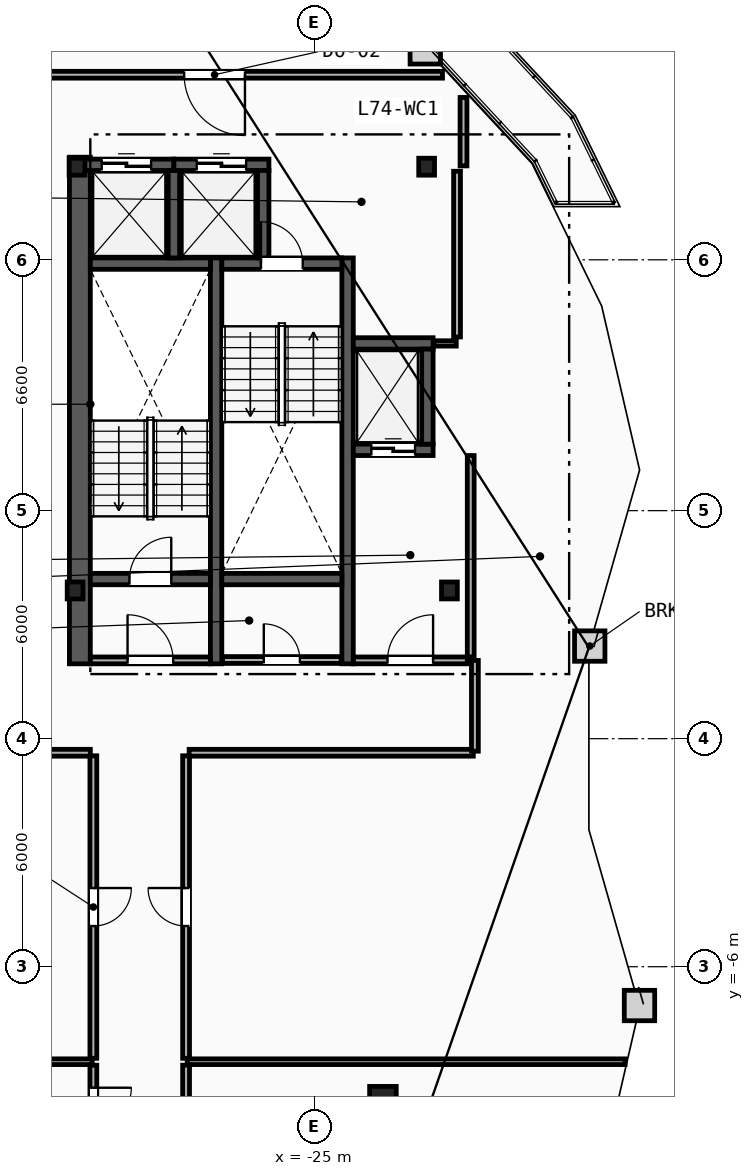
"""IFC4 building model, lengths in metres.
Left out: names, types, materials, properties, quantities, classifications, styles, units other than length and angle.
Written with IfcOpenShell. Run it as: python <this file> out.ifc"""

import sys

from ifc_helpers import new_model, si_unit, direction, frame, frame_2d, origin, origin_2d, place, context, subcontext, project, spatial, rectangle, i_section, extrude, element, fill, save


model = new_model("IFC4")
c1 = context("Model", 3, precision=1e-05, world=origin(), true_north=direction((0.0, 1.0)))
c2 = subcontext(c1, "Body", "Model", "MODEL_VIEW")
j1 = project(units=[si_unit("LENGTHUNIT", "METRE"), si_unit("PLANEANGLEUNIT", "RADIAN")], contexts=[c1])
p1 = place(None, origin())
s1 = spatial("IfcSite", under=j1, at=p1, CompositionType="ELEMENT")
p2 = place(p1, origin())
s2 = spatial("IfcBuilding", under=s1, at=p2, CompositionType="ELEMENT")
p3 = place(p2, frame((0.0, 0.0, 279.2)))
s3 = spatial("IfcBuildingStorey", under=s2, at=p3, CompositionType="ELEMENT", Elevation=279.2)
for number, where, z_axis, x_axis in (
    (1, (-31.3, 3.9, 0.0), (0.0, 0.0, 1.0), (1.0, 0.0, 0.0)),
    (2, (-21.45, 3.9, 0.0), (0.0, 0.0, 1.0), (1.0, 0.0, 0.0)),
    (3, (-22.05, 15.05, 0.0), (0.0, 0.0, 1.0), (1.0, 0.0, 0.0)),
    (4, (-31.25, 15.05, 0.0), (0.0, 0.0, 1.0), (1.0, 0.0, 0.0)),
):
    element("IfcColumn", number, at=place(p3, frame(where, z_axis=z_axis, x_axis=x_axis)), inside=s3, PredefinedType="COLUMN", context=c2, shape_type="SweptSolid", body=[
        extrude(i_section(OverallWidth=0.416, OverallDepth=0.446, WebThickness=0.039, FlangeThickness=0.063, FilletRadius=0.018, at=origin_2d()), origin(), (0.0, 0.0, 1.0), 3.6),
    ])
p4 = place(p3, frame((-23.2, -9.5, 0.0), z_axis=(0.0, 0.0, 1.0), x_axis=(1.0, 0.0, 0.0)))
e5 = element("IfcColumn", 5, at=p4, inside=s3, PredefinedType="COLUMN", context=c2, shape_type="SweptSolid", body=[
    extrude(rectangle(XDim=0.7, YDim=0.7, at=origin_2d()), origin(), (0.0, 0.0, 1.0), 3.6),
])
p5 = place(p3, frame((-31.175, 1.97, 0.0), z_axis=(0.0, 0.0, 1.0), x_axis=(0.0, 1.0, 0.0)))
e6 = element("IfcWall", 6, at=p5, inside=s3, PredefinedType="SHEAR", context=c2, shape_type="SweptSolid", body=[
    extrude(rectangle(XDim=13.33, YDim=0.55, at=frame_2d((6.665, 0.0))), origin(), (0.0, 0.0, 1.0), 3.34),
])
for number, where, z_axis, x_axis in (
    (7, (-27.59, 1.97, 0.0), (0.0, 0.0, 1.0), (0.0, 1.0, 0.0)),
    (8, (-24.13, 1.97, 0.0), (0.0, 0.0, 1.0), (0.0, 1.0, 0.0)),
):
    element("IfcWall", number, at=place(p3, frame(where, z_axis=z_axis, x_axis=x_axis)), inside=s3, PredefinedType="SHEAR", context=c2, shape_type="SweptSolid", body=[
        extrude(rectangle(XDim=10.68, YDim=0.3, at=frame_2d((5.34, 0.0))), origin(), (0.0, 0.0, 1.0), 3.34),
    ])
p6 = place(p3, frame((-30.9, 4.2, 0.0), z_axis=(0.0, 0.0, 1.0), x_axis=(1.0, 0.0, 0.0)))
e9 = element("IfcWall", 9, at=p6, inside=s3, PredefinedType="SHEAR", context=c2, shape_type="SweptSolid", body=[
    extrude(rectangle(XDim=3.16, YDim=0.3, at=frame_2d((1.58, 0.0))), origin(), (0.0, 0.0, 1.0), 3.34),
])
p7 = place(p6, frame((1.03, 0.0, 0.0)))
e10 = element("IfcOpeningElement", 10, at=p7, cuts=e9, PredefinedType="OPENING", context=c2, shape_type="SweptSolid", body=[
    extrude(rectangle(XDim=1.1, YDim=2.15, at=frame_2d((0.55, 1.075))), frame((0.0, 0.16, 0.0), z_axis=(0.0, -1.0, 0.0), x_axis=(1.0, 0.0, 0.0)), (0.0, 0.0, 1.0), 0.32),
])
p8 = place(p3, frame((-30.9, 12.5, 0.0), z_axis=(0.0, 0.0, 1.0), x_axis=(1.0, 0.0, 0.0)))
e11 = element("IfcWall", 11, at=p8, inside=s3, PredefinedType="SHEAR", context=c2, shape_type="SweptSolid", body=[
    extrude(rectangle(XDim=3.16, YDim=0.3, at=frame_2d((1.58, 0.0))), origin(), (0.0, 0.0, 1.0), 3.34),
])
p9 = place(p3, frame((-27.44, 12.5, 0.0), z_axis=(0.0, 0.0, 1.0), x_axis=(1.0, 0.0, 0.0)))
e12 = element("IfcWall", 12, at=p9, inside=s3, PredefinedType="SHEAR", context=c2, shape_type="SweptSolid", body=[
    extrude(rectangle(XDim=3.16, YDim=0.3, at=frame_2d((1.58, 0.0))), origin(), (0.0, 0.0, 1.0), 3.34),
])
p10 = place(p9, frame((1.03, 0.0, 0.0)))
e13 = element("IfcOpeningElement", 13, at=p10, cuts=e12, PredefinedType="OPENING", context=c2, shape_type="SweptSolid", body=[
    extrude(rectangle(XDim=1.1, YDim=2.15, at=frame_2d((0.55, 1.075))), frame((0.0, 0.16, 0.0), z_axis=(0.0, -1.0, 0.0), x_axis=(1.0, 0.0, 0.0)), (0.0, 0.0, 1.0), 0.32),
])
p11 = place(p3, frame((-27.44, 4.2, 0.0), z_axis=(0.0, 0.0, 1.0), x_axis=(1.0, 0.0, 0.0)))
e14 = element("IfcWall", 14, at=p11, inside=s3, PredefinedType="SHEAR", context=c2, shape_type="SweptSolid", body=[
    extrude(rectangle(XDim=3.16, YDim=0.3, at=frame_2d((1.58, 0.0))), origin(), (0.0, 0.0, 1.0), 3.34),
])
p12 = place(p3, frame((-20.89, 2.15, 0.0), z_axis=(0.0, 0.0, 1.0), x_axis=(0.0, 1.0, 0.0)))
e15 = element("IfcWall", 15, at=p12, inside=s3, PredefinedType="PARTITIONING", context=c2, shape_type="SweptSolid", body=[
    extrude(rectangle(XDim=5.3, YDim=0.18, at=frame_2d((2.65, 0.0))), origin(), (0.0, 0.0, 1.0), 3.34),
])
p13 = place(p3, frame((-23.98, 2.06, 0.0), z_axis=(0.0, 0.0, 1.0), x_axis=(1.0, 0.0, 0.0)))
e16 = element("IfcWall", 16, at=p13, inside=s3, PredefinedType="PARTITIONING", context=c2, shape_type="SweptSolid", body=[
    extrude(rectangle(XDim=3.0, YDim=0.18, at=frame_2d((1.5, 0.0))), origin(), (0.0, 0.0, 1.0), 3.34),
])
p14 = place(p13, frame((0.9, 0.0, 0.0)))
e17 = element("IfcOpeningElement", 17, at=p14, cuts=e16, PredefinedType="OPENING", context=c2, shape_type="SweptSolid", body=[
    extrude(rectangle(XDim=1.2, YDim=2.15, at=frame_2d((0.6, 1.075))), frame((0.0, 0.1, 0.0), z_axis=(0.0, -1.0, 0.0), x_axis=(1.0, 0.0, 0.0)), (0.0, 0.0, 1.0), 0.2),
])
p15 = place(p3, frame((-30.9, 2.06, 0.0), z_axis=(0.0, 0.0, 1.0), x_axis=(1.0, 0.0, 0.0)))
e18 = element("IfcWall", 18, at=p15, inside=s3, PredefinedType="PARTITIONING", context=c2, shape_type="SweptSolid", body=[
    extrude(rectangle(XDim=3.16, YDim=0.18, at=frame_2d((1.58, 0.0))), origin(), (0.0, 0.0, 1.0), 3.34),
])
p16 = place(p15, frame((0.98, 0.0, 0.0)))
e19 = element("IfcOpeningElement", 19, at=p16, cuts=e18, PredefinedType="OPENING", context=c2, shape_type="SweptSolid", body=[
    extrude(rectangle(XDim=1.2, YDim=2.15, at=frame_2d((0.6, 1.075))), frame((0.0, 0.1, 0.0), z_axis=(0.0, -1.0, 0.0), x_axis=(1.0, 0.0, 0.0)), (0.0, 0.0, 1.0), 0.2),
])
p17 = place(p3, frame((-23.98, 7.6, 0.0), z_axis=(0.0, 0.0, 1.0), x_axis=(1.0, 0.0, 0.0)))
e20 = element("IfcWall", 20, at=p17, inside=s3, PredefinedType="SHEAR", context=c2, shape_type="SweptSolid", body=[
    extrude(rectangle(XDim=2.1, YDim=0.3, at=frame_2d((1.05, 0.0))), origin(), (0.0, 0.0, 1.0), 3.34),
])
p18 = place(p17, frame((0.475, 0.0, 0.0)))
e21 = element("IfcOpeningElement", 21, at=p18, cuts=e20, PredefinedType="OPENING", context=c2, shape_type="SweptSolid", body=[
    extrude(rectangle(XDim=1.15, YDim=2.2, at=frame_2d((0.575, 1.1))), frame((0.0, 0.16, 0.0), z_axis=(0.0, -1.0, 0.0), x_axis=(1.0, 0.0, 0.0)), (0.0, 0.0, 1.0), 0.32),
])
p19 = place(p3, frame((-23.98, 10.4, 0.0), z_axis=(0.0, 0.0, 1.0), x_axis=(1.0, 0.0, 0.0)))
e22 = element("IfcWall", 22, at=p19, inside=s3, PredefinedType="SHEAR", context=c2, shape_type="SweptSolid", body=[
    extrude(rectangle(XDim=2.1, YDim=0.3, at=frame_2d((1.05, 0.0))), origin(), (0.0, 0.0, 1.0), 3.34),
])
p20 = place(p3, frame((-22.03, 7.75, 0.0), z_axis=(0.0, 0.0, 1.0), x_axis=(0.0, 1.0, 0.0)))
e23 = element("IfcWall", 23, at=p20, inside=s3, PredefinedType="SHEAR", context=c2, shape_type="SweptSolid", body=[
    extrude(rectangle(XDim=2.5, YDim=0.3, at=frame_2d((1.25, 0.0))), origin(), (0.0, 0.0, 1.0), 3.34),
])
p21 = place(p3, frame((-31.2, 15.1, 0.0), z_axis=(0.0, 0.0, 1.0), x_axis=(1.0, 0.0, 0.0)))
e24 = element("IfcWall", 24, at=p21, inside=s3, PredefinedType="SHEAR", context=c2, shape_type="SweptSolid", body=[
    extrude(rectangle(XDim=2.5, YDim=0.3, at=frame_2d((1.25, 0.0))), origin(), (0.0, 0.0, 1.0), 3.34),
])
p22 = place(p21, frame((0.6, 0.0, 0.0)))
e25 = element("IfcOpeningElement", 25, at=p22, cuts=e24, PredefinedType="OPENING", context=c2, shape_type="SweptSolid", body=[
    extrude(rectangle(XDim=1.3, YDim=2.2, at=frame_2d((0.65, 1.1))), frame((0.0, 0.16, 0.0), z_axis=(0.0, -1.0, 0.0), x_axis=(1.0, 0.0, 0.0)), (0.0, 0.0, 1.0), 0.32),
])
p23 = place(p3, frame((-28.7, 12.65, 0.0), z_axis=(0.0, 0.0, 1.0), x_axis=(0.0, 1.0, 0.0)))
e26 = element("IfcWall", 26, at=p23, inside=s3, PredefinedType="SHEAR", context=c2, shape_type="SweptSolid", body=[
    extrude(rectangle(XDim=2.3, YDim=0.3, at=frame_2d((1.15, 0.0))), origin(), (0.0, 0.0, 1.0), 3.34),
])
p24 = place(p3, frame((-28.7, 15.1, 0.0), z_axis=(0.0, 0.0, 1.0), x_axis=(1.0, 0.0, 0.0)))
e27 = element("IfcWall", 27, at=p24, inside=s3, PredefinedType="SHEAR", context=c2, shape_type="SweptSolid", body=[
    extrude(rectangle(XDim=2.5, YDim=0.3, at=frame_2d((1.25, 0.0))), origin(), (0.0, 0.0, 1.0), 3.34),
])
p25 = place(p24, frame((0.6, 0.0, 0.0)))
e28 = element("IfcOpeningElement", 28, at=p25, cuts=e27, PredefinedType="OPENING", context=c2, shape_type="SweptSolid", body=[
    extrude(rectangle(XDim=1.3, YDim=2.2, at=frame_2d((0.65, 1.1))), frame((0.0, 0.16, 0.0), z_axis=(0.0, -1.0, 0.0), x_axis=(1.0, 0.0, 0.0)), (0.0, 0.0, 1.0), 0.32),
])
p26 = place(p3, frame((-26.35, 12.65, 0.0), z_axis=(0.0, 0.0, 1.0), x_axis=(0.0, 1.0, 0.0)))
e29 = element("IfcWall", 29, at=p26, inside=s3, PredefinedType="SHEAR", context=c2, shape_type="SweptSolid", body=[
    extrude(rectangle(XDim=2.3, YDim=0.3, at=frame_2d((1.15, 0.0))), origin(), (0.0, 0.0, 1.0), 3.34),
])
p27 = place(p3, frame((-21.86, 10.4, 0.0), z_axis=(0.0, 0.0, 1.0), x_axis=(1.0, 0.0, 0.0)))
e30 = element("IfcWall", 30, at=p27, inside=s3, PredefinedType="PARTITIONING", context=c2, shape_type="SweptSolid", body=[
    extrude(rectangle(XDim=0.59, YDim=0.14, at=frame_2d((0.295, 0.0))), origin(), (0.0, 0.0, 1.0), 3.34),
])
p28 = place(p3, frame((-21.25, 10.57, 0.0), z_axis=(0.0, 0.0, 1.0), x_axis=(0.0, 1.0, 0.0)))
e31 = element("IfcWall", 31, at=p28, inside=s3, PredefinedType="PARTITIONING", context=c2, shape_type="SweptSolid", body=[
    extrude(rectangle(XDim=4.36, YDim=0.18, at=frame_2d((2.18, 0.0))), origin(), (0.0, 0.0, 1.0), 3.34),
])
p29 = place(p3, frame((-27.42, 2.07, 0.0), z_axis=(0.0, 0.0, 1.0), x_axis=(1.0, 0.0, 0.0)))
e32 = element("IfcWall", 32, at=p29, inside=s3, PredefinedType="PARTITIONING", context=c2, shape_type="SweptSolid", body=[
    extrude(rectangle(XDim=3.12, YDim=0.18, at=frame_2d((1.56, 0.0))), origin(), (0.0, 0.0, 1.0), 3.34),
])
p30 = place(p29, frame((1.085, 0.0, 0.0)))
e33 = element("IfcOpeningElement", 33, at=p30, cuts=e32, PredefinedType="OPENING", context=c2, shape_type="SweptSolid", body=[
    extrude(rectangle(XDim=0.95, YDim=2.1, at=frame_2d((0.475, 1.05))), frame((0.0, 0.1, 0.0), z_axis=(0.0, -1.0, 0.0), x_axis=(1.0, 0.0, 0.0)), (0.0, 0.0, 1.0), 0.2),
])
p31 = place(p3, frame((-47.172, -8.5, 0.0), z_axis=(0.0, 0.0, 1.0), x_axis=(1.0, 0.0, 0.0)))
e34 = element("IfcWall", 34, at=p31, inside=s3, PredefinedType="PARTITIONING", context=c2, shape_type="SweptSolid", body=[
    extrude(rectangle(XDim=16.322, YDim=0.15, at=frame_2d((8.161, 0.0))), origin(), (0.0, 0.0, 1.0), 3.34),
])
p32 = place(p3, frame((-28.35, -8.5, 0.0), z_axis=(0.0, 0.0, 1.0), x_axis=(1.0, 0.0, 0.0)))
e35 = element("IfcWall", 35, at=p32, inside=s3, PredefinedType="PARTITIONING", context=c2, shape_type="SweptSolid", body=[
    extrude(rectangle(XDim=11.522, YDim=0.15, at=frame_2d((5.761, 0.0))), origin(), (0.0, 0.0, 1.0), 3.34),
])
p33 = place(p3, frame((-30.82, -8.59, 0.0), z_axis=(0.0, 0.0, 1.0), x_axis=(0.0, -1.0, 0.0)))
e36 = element("IfcWall", 36, at=p33, inside=s3, PredefinedType="PARTITIONING", context=c2, shape_type="SweptSolid", body=[
    extrude(rectangle(XDim=2.188, YDim=0.18, at=frame_2d((1.094, 0.0))), origin(), (0.0, 0.0, 1.0), 3.34),
])
p34 = place(p33, frame((0.594, 0.0, 0.0)))
e37 = element("IfcOpeningElement", 37, at=p34, cuts=e36, PredefinedType="OPENING", context=c2, shape_type="SweptSolid", body=[
    extrude(rectangle(XDim=1.0, YDim=2.15, at=frame_2d((0.5, 1.075))), frame((0.0, 0.1, 0.0), z_axis=(0.0, -1.0, 0.0), x_axis=(1.0, 0.0, 0.0)), (0.0, 0.0, 1.0), 0.2),
])
p35 = place(p3, frame((-28.38, -10.779, 0.0), z_axis=(0.0, 0.0, 1.0), x_axis=(0.0, 1.0, 0.0)))
e38 = element("IfcWall", 38, at=p35, inside=s3, PredefinedType="PARTITIONING", context=c2, shape_type="SweptSolid", body=[
    extrude(rectangle(XDim=2.188, YDim=0.18, at=frame_2d((1.094, 0.0))), origin(), (0.0, 0.0, 1.0), 3.34),
])
p36 = place(p3, frame((-30.82, -0.45, 0.0), z_axis=(0.0, 0.0, 1.0), x_axis=(0.0, -1.0, 0.0)))
e39 = element("IfcWall", 39, at=p36, inside=s3, PredefinedType="PARTITIONING", context=c2, shape_type="SweptSolid", body=[
    extrude(rectangle(XDim=7.96, YDim=0.18, at=frame_2d((3.98, 0.0))), origin(), (0.0, 0.0, 1.0), 3.34),
])
p37 = place(p36, frame((3.48, 0.0, 0.0)))
e40 = element("IfcOpeningElement", 40, at=p37, cuts=e39, PredefinedType="OPENING", context=c2, shape_type="SweptSolid", body=[
    extrude(rectangle(XDim=1.0, YDim=2.15, at=frame_2d((0.5, 1.075))), frame((0.0, 0.1, 0.0), z_axis=(0.0, -1.0, 0.0), x_axis=(1.0, 0.0, 0.0)), (0.0, 0.0, 1.0), 0.2),
])
p38 = place(p3, frame((-33.628, -0.37, 0.0), z_axis=(0.0, 0.0, 1.0), x_axis=(1.0, 0.0, 0.0)))
e41 = element("IfcWall", 41, at=p38, inside=s3, PredefinedType="PARTITIONING", context=c2, shape_type="SweptSolid", body=[
    extrude(rectangle(XDim=2.729, YDim=0.18, at=frame_2d((1.364, 0.0))), origin(), (0.0, 0.0, 1.0), 3.34),
])
p39 = place(p3, frame((-28.38, -8.41, 0.0), z_axis=(0.0, 0.0, 1.0), x_axis=(0.0, 1.0, 0.0)))
e42 = element("IfcWall", 42, at=p39, inside=s3, PredefinedType="PARTITIONING", context=c2, shape_type="SweptSolid", body=[
    extrude(rectangle(XDim=7.96, YDim=0.18, at=frame_2d((3.98, 0.0))), origin(), (0.0, 0.0, 1.0), 3.34),
])
p40 = place(p39, frame((3.48, 0.0, 0.0)))
e43 = element("IfcOpeningElement", 43, at=p40, cuts=e42, PredefinedType="OPENING", context=c2, shape_type="SweptSolid", body=[
    extrude(rectangle(XDim=1.0, YDim=2.15, at=frame_2d((0.5, 1.075))), frame((0.0, 0.1, 0.0), z_axis=(0.0, -1.0, 0.0), x_axis=(1.0, 0.0, 0.0)), (0.0, 0.0, 1.0), 0.2),
])
p41 = place(p3, frame((-28.3, -0.37, 0.0), z_axis=(0.0, 0.0, 1.0), x_axis=(1.0, 0.0, 0.0)))
e44 = element("IfcWall", 44, at=p41, inside=s3, PredefinedType="PARTITIONING", context=c2, shape_type="SweptSolid", body=[
    extrude(rectangle(XDim=7.479, YDim=0.18, at=frame_2d((3.739, 0.0))), origin(), (0.0, 0.0, 1.0), 3.34),
])
p42 = place(p3, frame((-20.78, -0.329, 0.0), z_axis=(0.0, 0.0, 1.0), x_axis=(0.0, 1.0, 0.0)))
e45 = element("IfcWall", 45, at=p42, inside=s3, PredefinedType="PARTITIONING", context=c2, shape_type="SweptSolid", body=[
    extrude(rectangle(XDim=2.387, YDim=0.18, at=frame_2d((1.194, 0.0))), origin(), (0.0, 0.0, 1.0), 3.34),
])
p43 = place(p3, frame((-21.08, 15.072, 0.0), z_axis=(0.0, 0.0, 1.0), x_axis=(0.0, 1.0, 0.0)))
e46 = element("IfcWall", 46, at=p43, inside=s3, PredefinedType="PARTITIONING", context=c2, shape_type="SweptSolid", body=[
    extrude(rectangle(XDim=1.801, YDim=0.18, at=frame_2d((0.9, 0.0))), origin(), (0.0, 0.0, 1.0), 3.34),
])
p44 = place(p3, frame((-21.632, 17.47, 0.0), z_axis=(0.0, 0.0, 1.0), x_axis=(-1.0, 0.0, 0.0)))
e47 = element("IfcWall", 47, at=p44, inside=s3, PredefinedType="PARTITIONING", context=c2, shape_type="SweptSolid", body=[
    extrude(rectangle(XDim=11.996, YDim=0.18, at=frame_2d((5.998, 0.0))), origin(), (0.0, 0.0, 1.0), 3.34),
])
p45 = place(p44, frame((5.198, 0.0, 0.0)))
e48 = element("IfcOpeningElement", 48, at=p45, cuts=e47, PredefinedType="OPENING", context=c2, shape_type="SweptSolid", body=[
    extrude(rectangle(XDim=1.6, YDim=2.2, at=frame_2d((0.8, 1.1))), frame((0.0, 0.1, 0.0), z_axis=(0.0, -1.0, 0.0), x_axis=(1.0, 0.0, 0.0)), (0.0, 0.0, 1.0), 0.2),
])
p46 = place(p7, origin())
e49 = element("IfcDoor", 49, at=p46, inside=s3, OperationType="SINGLE_SWING_RIGHT", PredefinedType="DOOR", context=c2, shape_type="SweptSolid", body=[
    extrude(rectangle(XDim=1.1, YDim=2.15, at=frame_2d((0.55, 1.075))), frame((0.0, 0.025, 0.0), z_axis=(0.0, -1.0, 0.0), x_axis=(1.0, 0.0, 0.0)), (0.0, 0.0, 1.0), 0.05),
])
fill(e10, e49)
p47 = place(p10, origin())
e50 = element("IfcDoor", 50, at=p47, inside=s3, OperationType="SINGLE_SWING_LEFT", PredefinedType="DOOR", context=c2, shape_type="SweptSolid", body=[
    extrude(rectangle(XDim=1.1, YDim=2.15, at=frame_2d((0.55, 1.075))), frame((0.0, 0.025, 0.0), z_axis=(0.0, -1.0, 0.0), x_axis=(1.0, 0.0, 0.0)), (0.0, 0.0, 1.0), 0.05),
])
fill(e13, e50)
p48 = place(p14, origin())
e51 = element("IfcDoor", 51, at=p48, inside=s3, OperationType="SINGLE_SWING_RIGHT", PredefinedType="DOOR", context=c2, shape_type="SweptSolid", body=[
    extrude(rectangle(XDim=1.2, YDim=2.15, at=frame_2d((0.6, 1.075))), frame((0.0, 0.025, 0.0), z_axis=(0.0, -1.0, 0.0), x_axis=(1.0, 0.0, 0.0)), (0.0, 0.0, 1.0), 0.05),
])
fill(e17, e51)
p49 = place(p16, origin())
e52 = element("IfcDoor", 52, at=p49, inside=s3, OperationType="SINGLE_SWING_LEFT", PredefinedType="DOOR", context=c2, shape_type="SweptSolid", body=[
    extrude(rectangle(XDim=1.2, YDim=2.15, at=frame_2d((0.6, 1.075))), frame((0.0, 0.025, 0.0), z_axis=(0.0, -1.0, 0.0), x_axis=(1.0, 0.0, 0.0)), (0.0, 0.0, 1.0), 0.05),
])
fill(e19, e52)
p50 = place(p18, origin())
e53 = element("IfcDoor", 53, at=p50, inside=s3, OperationType="SLIDING_TO_LEFT", PredefinedType="TRAPDOOR", context=c2, shape_type="SweptSolid", body=[
    extrude(rectangle(XDim=1.15, YDim=2.2, at=frame_2d((0.575, 1.1))), frame((0.0, 0.025, 0.0), z_axis=(0.0, -1.0, 0.0), x_axis=(1.0, 0.0, 0.0)), (0.0, 0.0, 1.0), 0.05),
])
fill(e21, e53)
p51 = place(p22, origin())
e54 = element("IfcDoor", 54, at=p51, inside=s3, OperationType="SLIDING_TO_LEFT", PredefinedType="TRAPDOOR", context=c2, shape_type="SweptSolid", body=[
    extrude(rectangle(XDim=1.3, YDim=2.2, at=frame_2d((0.65, 1.1))), frame((0.0, 0.025, 0.0), z_axis=(0.0, -1.0, 0.0), x_axis=(1.0, 0.0, 0.0)), (0.0, 0.0, 1.0), 0.05),
])
fill(e25, e54)
p52 = place(p25, origin())
e55 = element("IfcDoor", 55, at=p52, inside=s3, OperationType="SLIDING_TO_LEFT", PredefinedType="TRAPDOOR", context=c2, shape_type="SweptSolid", body=[
    extrude(rectangle(XDim=1.3, YDim=2.2, at=frame_2d((0.65, 1.1))), frame((0.0, 0.025, 0.0), z_axis=(0.0, -1.0, 0.0), x_axis=(1.0, 0.0, 0.0)), (0.0, 0.0, 1.0), 0.05),
])
fill(e28, e55)
p53 = place(p45, origin())
e56 = element("IfcDoor", 56, at=p53, inside=s3, OperationType="SINGLE_SWING_LEFT", PredefinedType="DOOR", context=c2, shape_type="SweptSolid", body=[
    extrude(rectangle(XDim=1.6, YDim=2.2, at=frame_2d((0.8, 1.1))), frame((0.0, 0.025, 0.0), z_axis=(0.0, -1.0, 0.0), x_axis=(1.0, 0.0, 0.0)), (0.0, 0.0, 1.0), 0.05),
])
fill(e48, e56)
p54 = place(p37, origin())
e57 = element("IfcDoor", 57, at=p54, inside=s3, OperationType="SINGLE_SWING_LEFT", PredefinedType="DOOR", context=c2, shape_type="SweptSolid", body=[
    extrude(rectangle(XDim=1.0, YDim=2.15, at=frame_2d((0.5, 1.075))), frame((0.0, 0.025, 0.0), z_axis=(0.0, -1.0, 0.0), x_axis=(1.0, 0.0, 0.0)), (0.0, 0.0, 1.0), 0.05),
])
fill(e40, e57)
p55 = place(p40, origin())
e58 = element("IfcDoor", 58, at=p55, inside=s3, OperationType="SINGLE_SWING_RIGHT", PredefinedType="DOOR", context=c2, shape_type="SweptSolid", body=[
    extrude(rectangle(XDim=1.0, YDim=2.15, at=frame_2d((0.5, 1.075))), frame((0.0, 0.025, 0.0), z_axis=(0.0, -1.0, 0.0), x_axis=(1.0, 0.0, 0.0)), (0.0, 0.0, 1.0), 0.05),
])
fill(e43, e58)
p56 = place(p30, origin())
e59 = element("IfcDoor", 59, at=p56, inside=s3, OperationType="SINGLE_SWING_LEFT", PredefinedType="DOOR", context=c2, shape_type="SweptSolid", body=[
    extrude(rectangle(XDim=0.95, YDim=2.1, at=frame_2d((0.475, 1.05))), frame((0.0, 0.025, 0.0), z_axis=(0.0, -1.0, 0.0), x_axis=(1.0, 0.0, 0.0)), (0.0, 0.0, 1.0), 0.05),
])
fill(e33, e59)
p57 = place(p34, origin())
e60 = element("IfcDoor", 60, at=p57, inside=s3, OperationType="SINGLE_SWING_LEFT", PredefinedType="DOOR", context=c2, shape_type="SweptSolid", body=[
    extrude(rectangle(XDim=1.0, YDim=2.15, at=frame_2d((0.5, 1.075))), frame((0.0, 0.025, 0.0), z_axis=(0.0, -1.0, 0.0), x_axis=(1.0, 0.0, 0.0)), (0.0, 0.0, 1.0), 0.05),
])
fill(e37, e60)
save(model, sys.argv[1])
